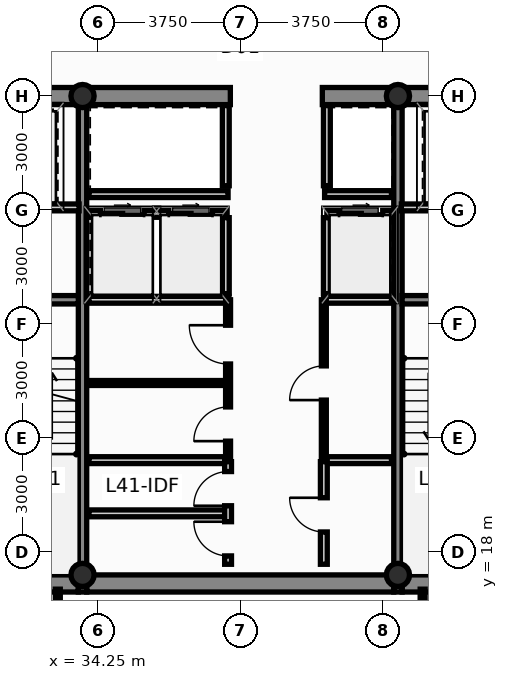
"""IFC4 building model, lengths in metres.
Left out: names, types, materials, properties, quantities, classifications, styles, units other than length and angle.
Written with IfcOpenShell. Run it as: python <this file> out.ifc"""

import sys

from ifc_helpers import new_model, si_unit, direction, frame, frame_2d, origin, origin_2d, place, context, subcontext, project, spatial, rectangle, hollow_circle, extrude, source, transform, mapped, element, fill, save


model = new_model("IFC4")
c1 = context("Model", 3, precision=1e-05, world=origin(), true_north=direction((0.0, 1.0)))
c2 = subcontext(c1, "Body", "Model", "MODEL_VIEW")
j1 = project(units=[si_unit("LENGTHUNIT", "METRE"), si_unit("PLANEANGLEUNIT", "RADIAN")], contexts=[c1])
p1 = place(None, origin())
s1 = spatial("IfcSite", under=j1, at=p1, CompositionType="ELEMENT")
p2 = place(p1, origin())
s2 = spatial("IfcBuilding", under=s1, at=p2, CompositionType="ELEMENT")
p3 = place(p2, frame((0.0, 0.0, 158.5)))
s3 = spatial("IfcBuildingStorey", under=s2, at=p3, CompositionType="ELEMENT", Elevation=158.5)
m1 = source(origin(), c2, "Body", "SweptSolid", [
    extrude(hollow_circle(Radius=0.305, WallThickness=0.025, at=origin_2d()), origin(), (0.0, 0.0, 1.0), 3.65),
])
for number, where, z_axis, x_axis in (
    (1, (33.85, 17.4, 0.0), (0.0, 0.0, 1.0), (1.0, 0.0, 0.0)),
    (2, (42.15, 17.4, 0.0), (0.0, 0.0, 1.0), (1.0, 0.0, 0.0)),
    (3, (33.85, 30.0, 0.0), (0.0, 0.0, 1.0), (1.0, 0.0, 0.0)),
    (4, (42.15, 30.0, 0.0), (0.0, 0.0, 1.0), (1.0, 0.0, 0.0)),
):
    element("IfcColumn", number, at=place(p3, frame(where, z_axis=z_axis, x_axis=x_axis)), inside=s3, PredefinedType="COLUMN", context=c2, shape_type="MappedRepresentation", body=[
        mapped(m1, transform((0.0, 0.0, 0.0), scale=1.0)),
    ])
p4 = place(p3, frame((30.84, 17.175, 0.0), z_axis=(0.0, 0.0, 1.0), x_axis=(1.0, 0.0, 0.0)))
e5 = element("IfcWall", 5, at=p4, inside=s3, PredefinedType="SHEAR", context=c2, shape_type="SweptSolid", body=[
    extrude(rectangle(XDim=2.9, YDim=0.45, at=frame_2d((1.45, 0.0))), origin(), (0.0, 0.0, 1.0), 3.65),
])
p5 = place(p3, frame((33.96, 17.175, 0.0), z_axis=(0.0, 0.0, 1.0), x_axis=(1.0, 0.0, 0.0)))
e6 = element("IfcWall", 6, at=p5, inside=s3, PredefinedType="SHEAR", context=c2, shape_type="SweptSolid", body=[
    extrude(rectangle(XDim=8.08, YDim=0.45, at=frame_2d((4.04, 0.0))), origin(), (0.0, 0.0, 1.0), 3.65),
])
for number, where, z_axis, x_axis in (
    (7, (42.26, 17.175, 0.0), (0.0, 0.0, 1.0), (1.0, 0.0, 0.0)),
    (8, (30.84, 30.0, 0.0), (0.0, 0.0, 1.0), (1.0, 0.0, 0.0)),
):
    element("IfcWall", number, at=place(p3, frame(where, z_axis=z_axis, x_axis=x_axis)), inside=s3, PredefinedType="SHEAR", context=c2, shape_type="SweptSolid", body=[
        extrude(rectangle(XDim=2.9, YDim=0.45, at=frame_2d((1.45, 0.0))), origin(), (0.0, 0.0, 1.0), 3.65),
    ])
p6 = place(p3, frame((33.96, 30.0, 0.0), z_axis=(0.0, 0.0, 1.0), x_axis=(1.0, 0.0, 0.0)))
e9 = element("IfcWall", 9, at=p6, inside=s3, PredefinedType="SHEAR", context=c2, shape_type="SweptSolid", body=[
    extrude(rectangle(XDim=3.78, YDim=0.45, at=frame_2d((1.89, 0.0))), origin(), (0.0, 0.0, 1.0), 3.65),
])
p7 = place(p3, frame((40.16, 30.0, 0.0), z_axis=(0.0, 0.0, 1.0), x_axis=(1.0, 0.0, 0.0)))
e10 = element("IfcWall", 10, at=p7, inside=s3, PredefinedType="SHEAR", context=c2, shape_type="SweptSolid", body=[
    extrude(rectangle(XDim=1.88, YDim=0.45, at=frame_2d((0.94, 0.0))), origin(), (0.0, 0.0, 1.0), 3.65),
])
p8 = place(p3, frame((42.26, 30.0, 0.0), z_axis=(0.0, 0.0, 1.0), x_axis=(1.0, 0.0, 0.0)))
e11 = element("IfcWall", 11, at=p8, inside=s3, PredefinedType="SHEAR", context=c2, shape_type="SweptSolid", body=[
    extrude(rectangle(XDim=2.9, YDim=0.45, at=frame_2d((1.45, 0.0))), origin(), (0.0, 0.0, 1.0), 3.65),
])
for number, where, z_axis, x_axis in (
    (12, (33.85, 16.95, 0.0), (0.0, 0.0, 1.0), (0.0, 1.0, 0.0)),
    (13, (42.15, 16.95, 0.0), (0.0, 0.0, 1.0), (0.0, 1.0, 0.0)),
):
    element("IfcWall", number, at=place(p3, frame(where, z_axis=z_axis, x_axis=x_axis)), inside=s3, PredefinedType="SHEAR", context=c2, shape_type="SweptSolid", body=[
        extrude(rectangle(XDim=13.275, YDim=0.22, at=frame_2d((6.638, 0.0))), origin(), (0.0, 0.0, 1.0), 3.65),
    ])
for number, where, z_axis, x_axis in (
    (14, (30.84, 24.64, 0.0), (0.0, 0.0, 1.0), (1.0, 0.0, 0.0)),
    (15, (42.26, 24.64, 0.0), (0.0, 0.0, 1.0), (1.0, 0.0, 0.0)),
):
    element("IfcWall", number, at=place(p3, frame(where, z_axis=z_axis, x_axis=x_axis)), inside=s3, PredefinedType="SHEAR", context=c2, shape_type="SweptSolid", body=[
        extrude(rectangle(XDim=2.9, YDim=0.22, at=frame_2d((1.45, 0.0))), origin(), (0.0, 0.0, 1.0), 3.65),
    ])
p9 = place(p3, frame((34.02, 26.9, 0.0), z_axis=(0.0, 0.0, 1.0), x_axis=(1.0, 0.0, 0.0)))
e16 = element("IfcWall", 16, at=p9, inside=s3, PredefinedType="PARTITIONING", context=c2, shape_type="SweptSolid", body=[
    extrude(rectangle(XDim=3.6, YDim=0.18, at=frame_2d((1.8, 0.0))), origin(), (0.0, 0.0, 1.0), 3.4),
])
p10 = place(p9, frame((0.3, 0.0, 0.0)))
e17 = element("IfcOpeningElement", 17, at=p10, cuts=e16, PredefinedType="OPENING", context=c2, shape_type="SweptSolid", body=[
    extrude(rectangle(XDim=1.15, YDim=2.2, at=frame_2d((0.575, 1.1))), frame((0.0, 0.102, 0.0), z_axis=(0.0, -1.0, 0.0), x_axis=(1.0, 0.0, 0.0)), (0.0, 0.0, 1.0), 0.204),
])
p11 = place(p9, frame((2.1, 0.0, 0.0)))
e18 = element("IfcOpeningElement", 18, at=p11, cuts=e16, PredefinedType="OPENING", context=c2, shape_type="SweptSolid", body=[
    extrude(rectangle(XDim=1.15, YDim=2.2, at=frame_2d((0.575, 1.1))), frame((0.0, 0.102, 0.0), z_axis=(0.0, -1.0, 0.0), x_axis=(1.0, 0.0, 0.0)), (0.0, 0.0, 1.0), 0.204),
])
p12 = place(p3, frame((40.28, 26.9, 0.0), z_axis=(0.0, 0.0, 1.0), x_axis=(1.0, 0.0, 0.0)))
e19 = element("IfcWall", 19, at=p12, inside=s3, PredefinedType="PARTITIONING", context=c2, shape_type="SweptSolid", body=[
    extrude(rectangle(XDim=1.7, YDim=0.18, at=frame_2d((0.85, 0.0))), origin(), (0.0, 0.0, 1.0), 3.4),
])
p13 = place(p12, frame((0.32, 0.0, 0.0)))
e20 = element("IfcOpeningElement", 20, at=p13, cuts=e19, PredefinedType="OPENING", context=c2, shape_type="SweptSolid", body=[
    extrude(rectangle(XDim=1.15, YDim=2.2, at=frame_2d((0.575, 1.1))), frame((0.0, 0.102, 0.0), z_axis=(0.0, -1.0, 0.0), x_axis=(1.0, 0.0, 0.0)), (0.0, 0.0, 1.0), 0.204),
])
for number, where, z_axis, x_axis in (
    (21, (37.62, 24.8, 0.0), (0.0, 0.0, 1.0), (0.0, 1.0, 0.0)),
    (22, (40.28, 24.8, 0.0), (0.0, 0.0, 1.0), (0.0, 1.0, 0.0)),
):
    element("IfcWall", number, at=place(p3, frame(where, z_axis=z_axis, x_axis=x_axis)), inside=s3, PredefinedType="PARTITIONING", context=c2, shape_type="SweptSolid", body=[
        extrude(rectangle(XDim=2.0, YDim=0.18, at=frame_2d((1.0, 0.0))), origin(), (0.0, 0.0, 1.0), 3.4),
    ])
p14 = place(p3, frame((34.02, 24.64, 0.0), z_axis=(0.0, 0.0, 1.0), x_axis=(1.0, 0.0, 0.0)))
e23 = element("IfcWall", 23, at=p14, inside=s3, PredefinedType="PARTITIONING", context=c2, shape_type="SweptSolid", body=[
    extrude(rectangle(XDim=3.68, YDim=0.18, at=frame_2d((1.84, 0.0))), origin(), (0.0, 0.0, 1.0), 3.4),
])
p15 = place(p3, frame((40.2, 24.64, 0.0), z_axis=(0.0, 0.0, 1.0), x_axis=(1.0, 0.0, 0.0)))
e24 = element("IfcWall", 24, at=p15, inside=s3, PredefinedType="PARTITIONING", context=c2, shape_type="SweptSolid", body=[
    extrude(rectangle(XDim=1.78, YDim=0.18, at=frame_2d((0.89, 0.0))), origin(), (0.0, 0.0, 1.0), 3.4),
])
p16 = place(p3, frame((34.02, 27.42, 0.0), z_axis=(0.0, 0.0, 1.0), x_axis=(1.0, 0.0, 0.0)))
e25 = element("IfcWall", 25, at=p16, inside=s3, PredefinedType="PARTITIONING", context=c2, shape_type="SweptSolid", body=[
    extrude(rectangle(XDim=3.66, YDim=0.18, at=frame_2d((1.83, 0.0))), origin(), (0.0, 0.0, 1.0), 3.4),
])
p17 = place(p3, frame((40.22, 27.42, 0.0), z_axis=(0.0, 0.0, 1.0), x_axis=(1.0, 0.0, 0.0)))
e26 = element("IfcWall", 26, at=p17, inside=s3, PredefinedType="PARTITIONING", context=c2, shape_type="SweptSolid", body=[
    extrude(rectangle(XDim=1.76, YDim=0.18, at=frame_2d((0.88, 0.0))), origin(), (0.0, 0.0, 1.0), 3.4),
])
for number, where, z_axis, x_axis in (
    (27, (37.62, 27.64, 0.0), (0.0, 0.0, 1.0), (0.0, 1.0, 0.0)),
    (28, (40.28, 27.64, 0.0), (0.0, 0.0, 1.0), (0.0, 1.0, 0.0)),
):
    element("IfcWall", number, at=place(p3, frame(where, z_axis=z_axis, x_axis=x_axis)), inside=s3, PredefinedType="PARTITIONING", context=c2, shape_type="SweptSolid", body=[
        extrude(rectangle(XDim=2.11, YDim=0.18, at=frame_2d((1.055, 0.0))), origin(), (0.0, 0.0, 1.0), 3.4),
    ])
for number, where, z_axis, x_axis in (
    (29, (30.86, 27.07, 0.0), (0.0, 0.0, 1.0), (1.0, 0.0, 0.0)),
    (30, (42.24, 27.07, 0.0), (0.0, 0.0, 1.0), (1.0, 0.0, 0.0)),
):
    element("IfcWall", number, at=place(p3, frame(where, z_axis=z_axis, x_axis=x_axis)), inside=s3, PredefinedType="PARTITIONING", context=c2, shape_type="SweptSolid", body=[
        extrude(rectangle(XDim=2.9, YDim=0.18, at=frame_2d((1.45, 0.0))), origin(), (0.0, 0.0, 1.0), 3.4),
    ])
p18 = place(p3, frame((34.02, 20.42, 0.0), z_axis=(0.0, 0.0, 1.0), x_axis=(1.0, 0.0, 0.0)))
e31 = element("IfcWall", 31, at=p18, inside=s3, PredefinedType="PARTITIONING", context=c2, shape_type="SweptSolid", body=[
    extrude(rectangle(XDim=3.64, YDim=0.18, at=frame_2d((1.82, 0.0))), origin(), (0.0, 0.0, 1.0), 3.4),
])
p19 = place(p3, frame((40.22, 20.42, 0.0), z_axis=(0.0, 0.0, 1.0), x_axis=(1.0, 0.0, 0.0)))
e32 = element("IfcWall", 32, at=p19, inside=s3, PredefinedType="PARTITIONING", context=c2, shape_type="SweptSolid", body=[
    extrude(rectangle(XDim=1.76, YDim=0.18, at=frame_2d((0.88, 0.0))), origin(), (0.0, 0.0, 1.0), 3.4),
])
p20 = place(p3, frame((34.02, 22.45, 0.0), z_axis=(0.0, 0.0, 1.0), x_axis=(1.0, 0.0, 0.0)))
e33 = element("IfcWall", 33, at=p20, inside=s3, PredefinedType="PARTITIONING", context=c2, shape_type="SweptSolid", body=[
    extrude(rectangle(XDim=3.58, YDim=0.13, at=frame_2d((1.79, 0.0))), origin(), (0.0, 0.0, 1.0), 3.4),
])
p21 = place(p3, frame((37.68, 20.5, 0.0), z_axis=(0.0, 0.0, 1.0), x_axis=(0.0, 1.0, 0.0)))
e34 = element("IfcWall", 34, at=p21, inside=s3, PredefinedType="PARTITIONING", context=c2, shape_type="SweptSolid", body=[
    extrude(rectangle(XDim=4.14, YDim=0.13, at=frame_2d((2.07, 0.0))), origin(), (0.0, 0.0, 1.0), 3.4),
])
p22 = place(p21, frame((0.42, 0.0, 0.0)))
e35 = element("IfcOpeningElement", 35, at=p22, cuts=e34, PredefinedType="OPENING", context=c2, shape_type="SweptSolid", body=[
    extrude(rectangle(XDim=0.9, YDim=2.1, at=frame_2d((0.45, 1.05))), frame((0.0, 0.077, 0.0), z_axis=(0.0, -1.0, 0.0), x_axis=(1.0, 0.0, 0.0)), (0.0, 0.0, 1.0), 0.154),
])
p23 = place(p21, frame((2.45, 0.0, 0.0)))
e36 = element("IfcOpeningElement", 36, at=p23, cuts=e34, PredefinedType="OPENING", context=c2, shape_type="SweptSolid", body=[
    extrude(rectangle(XDim=1.02, YDim=2.15, at=frame_2d((0.51, 1.075))), frame((0.0, 0.077, 0.0), z_axis=(0.0, -1.0, 0.0), x_axis=(1.0, 0.0, 0.0)), (0.0, 0.0, 1.0), 0.154),
])
p24 = place(p3, frame((40.2, 20.5, 0.0), z_axis=(0.0, 0.0, 1.0), x_axis=(0.0, 1.0, 0.0)))
e37 = element("IfcWall", 37, at=p24, inside=s3, PredefinedType="PARTITIONING", context=c2, shape_type="SweptSolid", body=[
    extrude(rectangle(XDim=4.14, YDim=0.13, at=frame_2d((2.07, 0.0))), origin(), (0.0, 0.0, 1.0), 3.4),
])
p25 = place(p24, frame((1.5, 0.0, 0.0)))
e38 = element("IfcOpeningElement", 38, at=p25, cuts=e37, PredefinedType="OPENING", context=c2, shape_type="SweptSolid", body=[
    extrude(rectangle(XDim=0.9, YDim=2.1, at=frame_2d((0.45, 1.05))), frame((0.0, 0.077, 0.0), z_axis=(0.0, -1.0, 0.0), x_axis=(1.0, 0.0, 0.0)), (0.0, 0.0, 1.0), 0.154),
])
p26 = place(p3, frame((34.02, 19.02, 0.0), z_axis=(0.0, 0.0, 1.0), x_axis=(1.0, 0.0, 0.0)))
e39 = element("IfcWall", 39, at=p26, inside=s3, PredefinedType="PARTITIONING", context=c2, shape_type="SweptSolid", body=[
    extrude(rectangle(XDim=3.58, YDim=0.18, at=frame_2d((1.79, 0.0))), origin(), (0.0, 0.0, 1.0), 3.4),
])
p27 = place(p3, frame((37.68, 17.68, 0.0), z_axis=(0.0, 0.0, 1.0), x_axis=(0.0, 1.0, 0.0)))
e40 = element("IfcWall", 40, at=p27, inside=s3, PredefinedType="PARTITIONING", context=c2, shape_type="SweptSolid", body=[
    extrude(rectangle(XDim=2.7, YDim=0.18, at=frame_2d((1.35, 0.0))), origin(), (0.0, 0.0, 1.0), 3.4),
])
p28 = place(p27, frame((0.22, 0.0, 0.0)))
e41 = element("IfcOpeningElement", 41, at=p28, cuts=e40, PredefinedType="OPENING", context=c2, shape_type="SweptSolid", body=[
    extrude(rectangle(XDim=0.9, YDim=2.1, at=frame_2d((0.45, 1.05))), frame((0.0, 0.102, 0.0), z_axis=(0.0, -1.0, 0.0), x_axis=(1.0, 0.0, 0.0)), (0.0, 0.0, 1.0), 0.204),
])
p29 = place(p27, frame((1.54, 0.0, 0.0)))
e42 = element("IfcOpeningElement", 42, at=p29, cuts=e40, PredefinedType="OPENING", context=c2, shape_type="SweptSolid", body=[
    extrude(rectangle(XDim=0.9, YDim=2.1, at=frame_2d((0.45, 1.05))), frame((0.0, 0.102, 0.0), z_axis=(0.0, -1.0, 0.0), x_axis=(1.0, 0.0, 0.0)), (0.0, 0.0, 1.0), 0.204),
])
p30 = place(p3, frame((40.2, 17.68, 0.0), z_axis=(0.0, 0.0, 1.0), x_axis=(0.0, 1.0, 0.0)))
e43 = element("IfcWall", 43, at=p30, inside=s3, PredefinedType="PARTITIONING", context=c2, shape_type="SweptSolid", body=[
    extrude(rectangle(XDim=2.7, YDim=0.18, at=frame_2d((1.35, 0.0))), origin(), (0.0, 0.0, 1.0), 3.4),
])
p31 = place(p30, frame((0.85, 0.0, 0.0)))
e44 = element("IfcOpeningElement", 44, at=p31, cuts=e43, PredefinedType="OPENING", context=c2, shape_type="SweptSolid", body=[
    extrude(rectangle(XDim=0.9, YDim=2.1, at=frame_2d((0.45, 1.05))), frame((0.0, 0.102, 0.0), z_axis=(0.0, -1.0, 0.0), x_axis=(1.0, 0.0, 0.0)), (0.0, 0.0, 1.0), 0.204),
])
for number, where, z_axis, x_axis in (
    (45, (33.2, 15.255, 0.0), (0.0, 0.0, 1.0), (0.0, 1.0, 0.0)),
    (46, (42.8, 15.255, 0.0), (0.0, 0.0, 1.0), (0.0, 1.0, 0.0)),
):
    element("IfcWall", number, at=place(p3, frame(where, z_axis=z_axis, x_axis=x_axis)), inside=s3, PredefinedType="PARTITIONING", context=c2, shape_type="SweptSolid", body=[
        extrude(rectangle(XDim=1.77, YDim=0.13, at=frame_2d((0.885, 0.0))), origin(), (0.0, 0.0, 1.0), 3.4),
    ])
p32 = place(p10, origin())
e47 = element("IfcDoor", 47, at=p32, inside=s3, OperationType="SLIDING_TO_LEFT", PredefinedType="DOOR", context=c2, shape_type="SweptSolid", body=[
    extrude(rectangle(XDim=1.15, YDim=2.2, at=frame_2d((0.575, 1.1))), frame((0.0, 0.025, 0.0), z_axis=(0.0, -1.0, 0.0), x_axis=(1.0, 0.0, 0.0)), (0.0, 0.0, 1.0), 0.05),
])
fill(e17, e47)
p33 = place(p11, origin())
e48 = element("IfcDoor", 48, at=p33, inside=s3, OperationType="SLIDING_TO_RIGHT", PredefinedType="DOOR", context=c2, shape_type="SweptSolid", body=[
    extrude(rectangle(XDim=1.15, YDim=2.2, at=frame_2d((0.575, 1.1))), frame((0.0, 0.025, 0.0), z_axis=(0.0, -1.0, 0.0), x_axis=(1.0, 0.0, 0.0)), (0.0, 0.0, 1.0), 0.05),
])
fill(e18, e48)
p34 = place(p13, origin())
e49 = element("IfcDoor", 49, at=p34, inside=s3, OperationType="SLIDING_TO_LEFT", PredefinedType="DOOR", context=c2, shape_type="SweptSolid", body=[
    extrude(rectangle(XDim=1.15, YDim=2.2, at=frame_2d((0.575, 1.1))), frame((0.0, 0.025, 0.0), z_axis=(0.0, -1.0, 0.0), x_axis=(1.0, 0.0, 0.0)), (0.0, 0.0, 1.0), 0.05),
])
fill(e20, e49)
p35 = place(p22, origin())
e50 = element("IfcDoor", 50, at=p35, inside=s3, OperationType="SINGLE_SWING_LEFT", PredefinedType="DOOR", context=c2, shape_type="SweptSolid", body=[
    extrude(rectangle(XDim=0.9, YDim=2.1, at=frame_2d((0.45, 1.05))), frame((0.0, 0.025, 0.0), z_axis=(0.0, -1.0, 0.0), x_axis=(1.0, 0.0, 0.0)), (0.0, 0.0, 1.0), 0.05),
])
fill(e35, e50)
p36 = place(p23, origin())
e51 = element("IfcDoor", 51, at=p36, inside=s3, OperationType="SINGLE_SWING_RIGHT", PredefinedType="DOOR", context=c2, shape_type="SweptSolid", body=[
    extrude(rectangle(XDim=1.02, YDim=2.15, at=frame_2d((0.51, 1.075))), frame((0.0, 0.025, 0.0), z_axis=(0.0, -1.0, 0.0), x_axis=(1.0, 0.0, 0.0)), (0.0, 0.0, 1.0), 0.05),
])
fill(e36, e51)
p37 = place(p25, origin())
e52 = element("IfcDoor", 52, at=p37, inside=s3, OperationType="SINGLE_SWING_LEFT", PredefinedType="DOOR", context=c2, shape_type="SweptSolid", body=[
    extrude(rectangle(XDim=0.9, YDim=2.1, at=frame_2d((0.45, 1.05))), frame((0.0, 0.025, 0.0), z_axis=(0.0, -1.0, 0.0), x_axis=(1.0, 0.0, 0.0)), (0.0, 0.0, 1.0), 0.05),
])
fill(e38, e52)
p38 = place(p28, origin())
e53 = element("IfcDoor", 53, at=p38, inside=s3, OperationType="SINGLE_SWING_RIGHT", PredefinedType="DOOR", context=c2, shape_type="SweptSolid", body=[
    extrude(rectangle(XDim=0.9, YDim=2.1, at=frame_2d((0.45, 1.05))), frame((0.0, 0.025, 0.0), z_axis=(0.0, -1.0, 0.0), x_axis=(1.0, 0.0, 0.0)), (0.0, 0.0, 1.0), 0.05),
])
fill(e41, e53)
p39 = place(p29, origin())
e54 = element("IfcDoor", 54, at=p39, inside=s3, OperationType="SINGLE_SWING_LEFT", PredefinedType="DOOR", context=c2, shape_type="SweptSolid", body=[
    extrude(rectangle(XDim=0.9, YDim=2.1, at=frame_2d((0.45, 1.05))), frame((0.0, 0.025, 0.0), z_axis=(0.0, -1.0, 0.0), x_axis=(1.0, 0.0, 0.0)), (0.0, 0.0, 1.0), 0.05),
])
fill(e42, e54)
p40 = place(p31, origin())
e55 = element("IfcDoor", 55, at=p40, inside=s3, OperationType="SINGLE_SWING_RIGHT", PredefinedType="DOOR", context=c2, shape_type="SweptSolid", body=[
    extrude(rectangle(XDim=0.9, YDim=2.1, at=frame_2d((0.45, 1.05))), frame((0.0, 0.025, 0.0), z_axis=(0.0, -1.0, 0.0), x_axis=(1.0, 0.0, 0.0)), (0.0, 0.0, 1.0), 0.05),
])
fill(e44, e55)
save(model, sys.argv[1])
